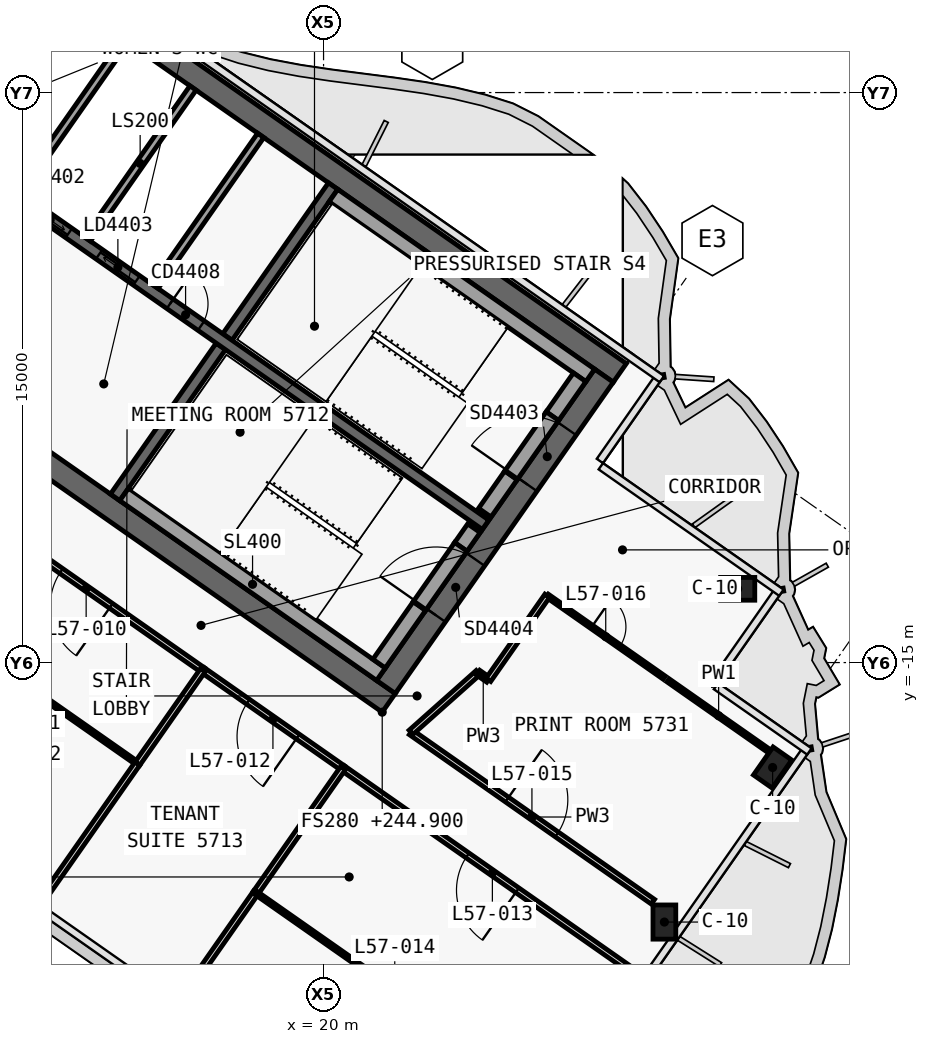
"""IFC4 building model, lengths in metres.
Left out: names, types, materials, properties, quantities, classifications, styles, units other than length and angle.
Written with IfcOpenShell. Run it as: python <this file> out.ifc"""

import sys

from ifc_helpers import new_model, si_unit, direction, frame, frame_2d, origin, origin_2d, place, context, subcontext, project, spatial, polyline, rectangle, outline, extrude, clip, halfspace, element, fill, save


model = new_model("IFC4")
c1 = context("Model", 3, precision=1e-05, world=origin(), true_north=direction((0.0, 1.0)))
c2 = subcontext(c1, "Body", "Model", "MODEL_VIEW")
j1 = project(units=[si_unit("LENGTHUNIT", "METRE"), si_unit("PLANEANGLEUNIT", "RADIAN")], contexts=[c1])
p1 = place(None, origin())
s1 = spatial("IfcSite", under=j1, at=p1, CompositionType="ELEMENT")
p2 = place(p1, origin())
s2 = spatial("IfcBuilding", under=s1, at=p2, CompositionType="ELEMENT")
p3 = place(p2, frame((0.0, 0.0, 244.9)))
s3 = spatial("IfcBuildingStorey", under=s2, at=p3, CompositionType="ELEMENT", Elevation=244.9)
p4 = place(p3, frame((0.028, 12.066, 0.0), z_axis=(0.0, 0.0, 1.0), x_axis=(0.819151382952, -0.573577380837, 0.0)))
e1 = element("IfcWall", 1, at=p4, inside=s3, PredefinedType="SHEAR", context=c2, shape_type="SweptSolid", body=[
    extrude(outline(polyline([(33.898, 0.3), (0.0, 0.3), (0.42, -0.3), (33.898, -0.3), (33.898, 0.3)])), origin(), (0.0, 0.0, 1.0), 3.9),
])
p5 = place(p3, frame((0.028, -0.874, 0.0), z_axis=(0.0, 0.0, 1.0), x_axis=(0.819150035022, -0.573579305871, 0.0)))
e2 = element("IfcWall", 2, at=p5, inside=s3, PredefinedType="SHEAR", context=c2, shape_type="SweptSolid", body=[
    extrude(outline(polyline([(26.476, 0.3), (0.0, 0.3), (0.42, -0.3), (26.476, -0.3), (26.476, 0.3)])), origin(), (0.0, 0.0, 1.0), 3.9),
])
p6 = place(p5, frame((6.576, 0.0, 0.0)))
e3 = element("IfcOpeningElement", 3, at=p6, cuts=e2, PredefinedType="OPENING", context=c2, shape_type="SweptSolid", body=[
    extrude(rectangle(XDim=1.5, YDim=2.1, at=frame_2d((0.75, 1.05))), frame((0.0, 0.31, 0.0), z_axis=(0.0, -1.0, 0.0), x_axis=(1.0, 0.0, 0.0)), (0.0, 0.0, 1.0), 0.62),
])
p7 = place(p5, frame((12.226, 0.0, 0.0)))
e4 = element("IfcOpeningElement", 4, at=p7, cuts=e2, PredefinedType="OPENING", context=c2, shape_type="SweptSolid", body=[
    extrude(rectangle(XDim=1.5, YDim=2.1, at=frame_2d((0.75, 1.05))), frame((0.0, 0.31, 0.0), z_axis=(0.0, -1.0, 0.0), x_axis=(1.0, 0.0, 0.0)), (0.0, 0.0, 1.0), 0.62),
])
p8 = place(p3, frame((21.642, -15.642, 0.0), z_axis=(0.0, 0.0, 1.0), x_axis=(0.573586866468, 0.819144740944, 0.0)))
e5 = element("IfcWall", 5, at=p8, inside=s3, PredefinedType="SHEAR", context=c2, shape_type="SweptSolid", body=[
    extrude(outline(polyline([(10.0, 0.3), (0.0, 0.3), (0.0, -0.3), (10.0, -0.3), (10.0, 0.3)])), origin(), (0.0, 0.0, 1.0), 3.9),
])
p9 = place(p8, frame((6.5, 0.0, 0.0)))
e6 = element("IfcOpeningElement", 6, at=p9, cuts=e5, PredefinedType="OPENING", context=c2, shape_type="SweptSolid", body=[
    extrude(rectangle(XDim=1.8, YDim=2.1, at=frame_2d((0.9, 1.05))), frame((0.0, 0.31, 0.0), z_axis=(0.0, -1.0, 0.0), x_axis=(1.0, 0.0, 0.0)), (0.0, 0.0, 1.0), 0.62),
])
p10 = place(p8, frame((2.3, 0.0, 0.0)))
e7 = element("IfcOpeningElement", 7, at=p10, cuts=e5, PredefinedType="OPENING", context=c2, shape_type="SweptSolid", body=[
    extrude(rectangle(XDim=1.8, YDim=2.1, at=frame_2d((0.9, 1.05))), frame((0.0, 0.31, 0.0), z_axis=(0.0, -1.0, 0.0), x_axis=(1.0, 0.0, 0.0)), (0.0, 0.0, 1.0), 0.62),
])
p11 = place(p3, frame((10.097, -1.271, 0.0), z_axis=(0.0, 0.0, 1.0), x_axis=(0.573560315113, 0.819163332265, 0.0)))
e8 = element("IfcWall", 8, at=p11, inside=s3, PredefinedType="SHEAR", context=c2, shape_type="SweptSolid", body=[
    extrude(outline(polyline([(4.85, -0.15), (4.85, 0.15), (0.0, 0.15), (0.0, -0.15), (4.85, -0.15)])), origin(), (0.0, 0.0, 1.0), 3.9),
])
p12 = place(p3, frame((14.515, -10.652, 0.0), z_axis=(0.0, 0.0, 1.0), x_axis=(0.573560315113, 0.819163332265, 0.0)))
e9 = element("IfcWall", 9, at=p12, inside=s3, PredefinedType="SHEAR", context=c2, shape_type="SweptSolid", body=[
    extrude(outline(polyline([(0.0, 0.15), (0.0, -0.15), (4.85, -0.15), (4.85, 0.15), (0.0, 0.15)])), origin(), (0.0, 0.0, 1.0), 3.9),
])
p13 = place(p3, frame((17.469, -6.433, 0.0), z_axis=(0.0, 0.0, 1.0), x_axis=(0.573594092424, 0.81913968109, 0.0)))
e10 = element("IfcWall", 10, at=p13, inside=s3, PredefinedType="SHEAR", context=c2, shape_type="SweptSolid", body=[
    extrude(outline(polyline([(4.85, -0.15), (4.85, 0.15), (0.0, 0.15), (0.0, -0.15), (4.85, -0.15)])), origin(), (0.0, 0.0, 1.0), 3.9),
])
p14 = place(p3, frame((2.638, 3.768, 0.0), z_axis=(0.0, 0.0, 1.0), x_axis=(0.819155014212, -0.573572194837, 0.0)))
e11 = element("IfcWall", 11, at=p14, inside=s3, PredefinedType="SHEAR", context=c2, shape_type="SweptSolid", body=[
    extrude(outline(polyline([(0.0, 0.15), (0.0, -0.15), (26.4, -0.15), (26.4, 0.15), (0.0, 0.15)])), origin(), (0.0, 0.0, 1.0), 3.9),
])
p15 = place(p14, frame((9.637, 0.0, 0.0)))
e12 = element("IfcOpeningElement", 12, at=p15, cuts=e11, PredefinedType="OPENING", context=c2, shape_type="SweptSolid", body=[
    extrude(rectangle(XDim=1.2, YDim=2.1, at=frame_2d((0.6, 1.05))), frame((0.0, 0.16, 0.0), z_axis=(0.0, -1.0, 0.0), x_axis=(1.0, 0.0, 0.0)), (0.0, 0.0, 1.0), 0.32),
])
p16 = place(p14, frame((11.812, 0.0, 0.0)))
e13 = element("IfcOpeningElement", 13, at=p16, cuts=e11, PredefinedType="OPENING", context=c2, shape_type="SweptSolid", body=[
    extrude(rectangle(XDim=1.2, YDim=2.1, at=frame_2d((0.6, 1.05))), frame((0.0, 0.16, 0.0), z_axis=(0.0, -1.0, 0.0), x_axis=(1.0, 0.0, 0.0)), (0.0, 0.0, 1.0), 0.32),
])
p17 = place(p14, frame((13.988, 0.0, 0.0)))
e14 = element("IfcOpeningElement", 14, at=p17, cuts=e11, PredefinedType="OPENING", context=c2, shape_type="SweptSolid", body=[
    extrude(rectangle(XDim=1.2, YDim=2.1, at=frame_2d((0.6, 1.05))), frame((0.0, 0.16, 0.0), z_axis=(0.0, -1.0, 0.0), x_axis=(1.0, 0.0, 0.0)), (0.0, 0.0, 1.0), 0.32),
])
p18 = place(p14, frame((16.262, 0.0, 0.0)))
e15 = element("IfcOpeningElement", 15, at=p18, cuts=e11, PredefinedType="OPENING", context=c2, shape_type="SweptSolid", body=[
    extrude(rectangle(XDim=1.0, YDim=2.1, at=frame_2d((0.5, 1.05))), frame((0.0, 0.16, 0.0), z_axis=(0.0, -1.0, 0.0), x_axis=(1.0, 0.0, 0.0)), (0.0, 0.0, 1.0), 0.32),
])
p19 = place(p3, frame((30.969, -12.956, 0.0), z_axis=(-0.334512857575, -0.477747821975, 0.812316543421), x_axis=(0.819159914019, -0.573565197047, 0.0)))
e16 = element("IfcColumn", 16, at=p19, inside=s3, PredefinedType="COLUMN", context=c2, shape_type="Clipping", body=[
    clip(clip(extrude(rectangle(XDim=0.9, YDim=0.6, at=origin_2d()), origin(), (0.0, 0.0, 1.0), 4.801), halfspace(frame((0.0, 0.0, 0.215), z_axis=(0.0, 0.0, 1.0), x_axis=(1.0, 0.0, 0.0)), True)), halfspace(frame((0.0, 0.0, 4.586), z_axis=(0.0, 0.0, 1.0), x_axis=(1.0, 0.0, 0.0)), False)),
])
p20 = place(p3, frame((28.891, -21.939, 0.0), z_axis=(0.291425634489, 0.416156539042, 0.861327367831), x_axis=(0.494070855631, 0.705534424526, -0.508050357174)))
e17 = element("IfcColumn", 17, at=p20, inside=s3, PredefinedType="COLUMN", context=c2, shape_type="Clipping", body=[
    clip(clip(extrude(rectangle(XDim=0.9, YDim=0.6, at=origin_2d()), origin(), (0.0, 0.0, 1.0), 4.528), halfspace(frame((0.0, 0.0, 0.265), z_axis=(0.0, 0.0, 1.0), x_axis=(1.0, 0.0, 0.0)), True)), halfspace(frame((0.0, 0.0, 4.262), z_axis=(0.0, 0.0, 1.0), x_axis=(1.0, 0.0, 0.0)), False)),
])
p21 = place(p3, frame((31.816, -17.761, 0.0), z_axis=(0.0, 0.0, 1.0), x_axis=(0.573576436351, 0.819152044289, 0.0)))
e18 = element("IfcColumn", 18, at=p21, inside=s3, PredefinedType="COLUMN", context=c2, shape_type="SweptSolid", body=[
    extrude(rectangle(XDim=0.9, YDim=0.6, at=origin_2d()), origin(), (0.0, 0.0, 1.0), 3.62),
])
p22 = place(p3, frame((12.001, -2.605, 0.0), z_axis=(0.0, 0.0, 1.0), x_axis=(0.573560315113, 0.819163332265, 0.0)))
e19 = element("IfcWall", 19, at=p22, inside=s3, PredefinedType="SOLIDWALL", context=c2, shape_type="SweptSolid", body=[
    extrude(rectangle(XDim=4.85, YDim=0.2, at=frame_2d((2.425, 0.0))), origin(), (0.0, 0.0, 1.0), 3.9),
])
p23 = place(p3, frame((13.783, -3.852, 0.0), z_axis=(0.0, 0.0, 1.0), x_axis=(0.573594092424, 0.81913968109, 0.0)))
e20 = element("IfcWall", 20, at=p23, inside=s3, PredefinedType="SOLIDWALL", context=c2, shape_type="SweptSolid", body=[
    extrude(rectangle(XDim=4.85, YDim=0.2, at=frame_2d((2.425, 0.0))), origin(), (0.0, 0.0, 1.0), 3.9),
])
p24 = place(p3, frame((15.565, -5.1, 0.0), z_axis=(0.0, 0.0, 1.0), x_axis=(0.573560315113, 0.819163332265, 0.0)))
e21 = element("IfcWall", 21, at=p24, inside=s3, PredefinedType="SOLIDWALL", context=c2, shape_type="SweptSolid", body=[
    extrude(rectangle(XDim=4.85, YDim=0.2, at=frame_2d((2.425, 0.0))), origin(), (0.0, 0.0, 1.0), 3.9),
])
p25 = place(p3, frame((20.259, -2.71, 0.0), z_axis=(0.0, 0.0, 1.0), x_axis=(0.81914849389, -0.573581506813, 0.0)))
e22 = element("IfcWall", 22, at=p25, inside=s3, PredefinedType="SOLIDWALL", context=c2, shape_type="SweptSolid", body=[
    extrude(rectangle(XDim=8.25, YDim=0.4, at=frame_2d((4.125, 0.0))), origin(), (0.0, 0.0, 1.0), 3.62),
])
p26 = place(p3, frame((24.244, -11.055, 0.0), z_axis=(0.0, 0.0, 1.0), x_axis=(0.573571582932, 0.819155442668, 0.0)))
e23 = element("IfcWall", 23, at=p26, inside=s3, PredefinedType="SOLIDWALL", context=c2, shape_type="SweptSolid", body=[
    extrude(rectangle(XDim=1.2, YDim=0.4, at=frame_2d((0.6, 0.0))), origin(), (0.0, 0.0, 1.0), 3.62),
])
p27 = place(p3, frame((26.022, -8.515, 0.0), z_axis=(0.0, 0.0, 1.0), x_axis=(0.573619628835, 0.819121798889, 0.0)))
e24 = element("IfcWall", 24, at=p27, inside=s3, PredefinedType="SOLIDWALL", context=c2, shape_type="SweptSolid", body=[
    extrude(rectangle(XDim=1.25, YDim=0.4, at=frame_2d((0.625, 0.0))), origin(), (0.0, 0.0, 1.0), 3.62),
])
p28 = place(p3, frame((24.932, -10.072, 2.15), z_axis=(0.0, 0.0, 1.0), x_axis=(0.573591692345, 0.819141361715, 0.0)))
e25 = element("IfcWall", 25, at=p28, inside=s3, PredefinedType="SOLIDWALL", context=c2, shape_type="SweptSolid", body=[
    extrude(rectangle(XDim=1.9, YDim=0.4, at=frame_2d((0.95, 0.0))), origin(), (0.0, 0.0, 1.0), 1.47),
])
p29 = place(p3, frame((14.753, -10.574, 0.0), z_axis=(0.0, 0.0, 1.0), x_axis=(0.819158229677, -0.573567602601, 0.0)))
e26 = element("IfcWall", 26, at=p29, inside=s3, PredefinedType="SOLIDWALL", context=c2, shape_type="SweptSolid", body=[
    extrude(rectangle(XDim=8.25, YDim=0.4, at=frame_2d((4.125, 0.0))), origin(), (0.0, 0.0, 1.0), 3.62),
])
p30 = place(p3, frame((21.462, -15.028, 0.0), z_axis=(0.0, 0.0, 1.0), x_axis=(0.573559770908, 0.819163713305, 0.0)))
e27 = element("IfcWall", 27, at=p30, inside=s3, PredefinedType="SOLIDWALL", context=c2, shape_type="SweptSolid", body=[
    extrude(rectangle(XDim=1.85, YDim=0.4, at=frame_2d((0.925, 0.0))), origin(), (0.0, 0.0, 1.0), 3.62),
])
p31 = place(p3, frame((23.613, -11.956, 0.0), z_axis=(0.0, 0.0, 1.0), x_axis=(0.573435029941, 0.819251039936, 0.0)))
e28 = element("IfcWall", 28, at=p31, inside=s3, PredefinedType="SOLIDWALL", context=c2, shape_type="SweptSolid", body=[
    extrude(rectangle(XDim=0.6, YDim=0.4, at=frame_2d((0.3, 0.0))), origin(), (0.0, 0.0, 1.0), 3.62),
])
p32 = place(p3, frame((22.523, -13.512, 2.15), z_axis=(0.0, 0.0, 1.0), x_axis=(0.573591692345, 0.819141361715, 0.0)))
e29 = element("IfcWall", 29, at=p32, inside=s3, PredefinedType="SOLIDWALL", context=c2, shape_type="SweptSolid", body=[
    extrude(rectangle(XDim=1.9, YDim=0.4, at=frame_2d((0.95, 0.0))), origin(), (0.0, 0.0, 1.0), 1.47),
])
p33 = place(p3, frame((22.3, -16.835, 0.0), z_axis=(0.0, 0.0, 1.0), x_axis=(0.819153708931, -0.573574058989, 0.0)))
e30 = element("IfcWall", 30, at=p33, inside=s3, PredefinedType="PARTITIONING", context=c2, shape_type="SweptSolid", body=[
    extrude(rectangle(XDim=7.773, YDim=0.15, at=frame_2d((3.887, 0.0))), origin(), (0.0, 0.0, 1.0), 3.05),
])
p34 = place(p33, frame((3.087, 0.0, 0.0)))
e31 = element("IfcOpeningElement", 31, at=p34, cuts=e30, PredefinedType="OPENING", context=c2, shape_type="SweptSolid", body=[
    extrude(rectangle(XDim=1.6, YDim=2.1, at=frame_2d((0.8, 1.05))), frame((0.0, 0.085, 0.0), z_axis=(0.0, -1.0, 0.0), x_axis=(1.0, 0.0, 0.0)), (0.0, 0.0, 1.0), 0.17),
])
p35 = place(p3, frame((16.826, -15.2, 0.0), z_axis=(0.0, 0.0, 1.0), x_axis=(-0.819138671238, 0.573595534573, 0.0)))
e32 = element("IfcWall", 32, at=p35, inside=s3, PredefinedType="PARTITIONING", context=c2, shape_type="SweptSolid", body=[
    extrude(rectangle(XDim=7.504, YDim=0.15, at=frame_2d((3.752, 0.0))), origin(), (0.0, 0.0, 1.0), 3.05),
])
p36 = place(p35, frame((2.952, 0.0, 0.0)))
e33 = element("IfcOpeningElement", 33, at=p36, cuts=e32, PredefinedType="OPENING", context=c2, shape_type="SweptSolid", body=[
    extrude(rectangle(XDim=1.6, YDim=2.1, at=frame_2d((0.8, 1.05))), frame((0.0, 0.085, 0.0), z_axis=(0.0, -1.0, 0.0), x_axis=(1.0, 0.0, 0.0)), (0.0, 0.0, 1.0), 0.17),
])
p37 = place(p3, frame((20.513, -17.781, 0.0), z_axis=(0.0, 0.0, 1.0), x_axis=(-0.819165703328, 0.573556928727, 0.0)))
e34 = element("IfcWall", 34, at=p37, inside=s3, PredefinedType="PARTITIONING", context=c2, shape_type="SweptSolid", body=[
    extrude(rectangle(XDim=4.504, YDim=0.15, at=frame_2d((2.252, 0.0))), origin(), (0.0, 0.0, 1.0), 3.05),
])
p38 = place(p37, frame((1.452, 0.0, 0.0)))
e35 = element("IfcOpeningElement", 35, at=p38, cuts=e34, PredefinedType="OPENING", context=c2, shape_type="SweptSolid", body=[
    extrude(rectangle(XDim=1.6, YDim=2.1, at=frame_2d((0.8, 1.05))), frame((0.0, 0.085, 0.0), z_axis=(0.0, -1.0, 0.0), x_axis=(1.0, 0.0, 0.0)), (0.0, 0.0, 1.0), 0.17),
])
p39 = place(p3, frame((28.375, -23.287, 0.0), z_axis=(0.0, 0.0, 1.0), x_axis=(-0.819147101588, 0.573583495196, 0.0)))
e36 = element("IfcWall", 36, at=p39, inside=s3, PredefinedType="PARTITIONING", context=c2, shape_type="SweptSolid", body=[
    extrude(rectangle(XDim=9.602, YDim=0.15, at=frame_2d((4.801, 0.0))), origin(), (0.0, 0.0, 1.0), 3.0),
])
p40 = place(p39, frame((4.001, 0.0, 0.0)))
e37 = element("IfcOpeningElement", 37, at=p40, cuts=e36, PredefinedType="OPENING", context=c2, shape_type="SweptSolid", body=[
    extrude(rectangle(XDim=1.6, YDim=2.1, at=frame_2d((0.8, 1.05))), frame((0.0, 0.085, 0.0), z_axis=(0.0, -1.0, 0.0), x_axis=(1.0, 0.0, 0.0)), (0.0, 0.0, 1.0), 0.17),
])
p41 = place(p3, frame((29.065, -15.467, 0.0), z_axis=(0.0, 0.0, 1.0), x_axis=(0.819143686935, -0.573588371704, 0.0)))
e38 = element("IfcWall", 38, at=p41, inside=s3, PredefinedType="PARTITIONING", context=c2, shape_type="SweptSolid", body=[
    extrude(rectangle(XDim=3.25, YDim=0.1, at=frame_2d((1.625, 0.0))), origin(), (0.0, 0.0, 1.0), 3.0),
])
p42 = place(p3, frame((25.885, -13.24, 0.0), z_axis=(0.0, 0.0, 1.0), x_axis=(0.819137356649, -0.573597411904, 0.0)))
e39 = element("IfcWall", 39, at=p42, inside=s3, PredefinedType="PARTITIONING", context=c2, shape_type="SweptSolid", body=[
    extrude(rectangle(XDim=3.76, YDim=0.1, at=frame_2d((1.88, 0.0))), origin(), (0.0, 0.0, 1.0), 3.62),
])
p43 = place(p42, frame((1.43, 0.0, 0.0)))
e40 = element("IfcOpeningElement", 40, at=p43, cuts=e39, PredefinedType="OPENING", context=c2, shape_type="SweptSolid", body=[
    extrude(rectangle(XDim=0.9, YDim=2.1, at=frame_2d((0.45, 1.05))), frame((0.0, 0.06, 0.0), z_axis=(0.0, -1.0, 0.0), x_axis=(1.0, 0.0, 0.0)), (0.0, 0.0, 1.0), 0.12),
])
p44 = place(p3, frame((22.301, -16.836, 0.0), z_axis=(0.0, 0.0, 1.0), x_axis=(0.746924703007, 0.664908631345, 0.0)))
e41 = element("IfcWall", 41, at=p44, inside=s3, PredefinedType="PARTITIONING", context=c2, shape_type="SweptSolid", body=[
    extrude(rectangle(XDim=2.364, YDim=0.15, at=frame_2d((1.182, 0.0))), origin(), (0.0, 0.0, 1.0), 3.62),
])
p45 = place(p3, frame((24.067, -15.265, 0.0), z_axis=(0.0, 0.0, 1.0), x_axis=(0.819092976344, -0.573660784876, 0.0)))
e42 = element("IfcWall", 42, at=p45, inside=s3, PredefinedType="PARTITIONING", context=c2, shape_type="SweptSolid", body=[
    extrude(rectangle(XDim=0.33, YDim=0.15, at=frame_2d((0.165, 0.0))), origin(), (0.0, 0.0, 1.0), 3.62),
])
p46 = place(p3, frame((24.337, -15.454, 0.0), z_axis=(0.0, 0.0, 1.0), x_axis=(0.573626181702, 0.819117209968, 0.0)))
e43 = element("IfcWall", 43, at=p46, inside=s3, PredefinedType="PARTITIONING", context=c2, shape_type="SweptSolid", body=[
    extrude(rectangle(XDim=2.7, YDim=0.15, at=frame_2d((1.35, 0.0))), origin(), (0.0, 0.0, 1.0), 3.62),
])
p47 = place(p3, frame((15.104, -17.657, 0.0), z_axis=(0.0, 0.0, 1.0), x_axis=(-0.819137093595, 0.573597787563, 0.0)))
e44 = element("IfcWall", 44, at=p47, inside=s3, PredefinedType="PARTITIONING", context=c2, shape_type="SweptSolid", body=[
    extrude(rectangle(XDim=7.5, YDim=0.1, at=frame_2d((3.75, 0.0))), origin(), (0.0, 0.0, 1.0), 3.05),
])
p48 = place(p47, frame((3.3, 0.0, 0.0)))
e45 = element("IfcOpeningElement", 45, at=p48, cuts=e44, PredefinedType="OPENING", context=c2, shape_type="SweptSolid", body=[
    extrude(rectangle(XDim=0.9, YDim=2.1, at=frame_2d((0.45, 1.05))), frame((0.0, 0.06, 0.0), z_axis=(0.0, -1.0, 0.0), x_axis=(1.0, 0.0, 0.0)), (0.0, 0.0, 1.0), 0.12),
])
p49 = place(p3, frame((15.104, -17.657, 0.0), z_axis=(0.0, 0.0, 1.0), x_axis=(-0.573553393703, -0.819168178442, 0.0)))
e46 = element("IfcWall", 46, at=p49, inside=s3, PredefinedType="PARTITIONING", context=c2, shape_type="SweptSolid", body=[
    extrude(rectangle(XDim=4.499, YDim=0.15, at=frame_2d((2.25, 0.0))), origin(), (0.0, 0.0, 1.0), 3.0),
])
p50 = place(p3, frame((16.825, -15.199, 0.0), z_axis=(0.0, 0.0, 1.0), x_axis=(-0.573598887793, -0.819136323161, 0.0)))
e47 = element("IfcWall", 47, at=p50, inside=s3, PredefinedType="PARTITIONING", context=c2, shape_type="SweptSolid", body=[
    extrude(rectangle(XDim=3.0, YDim=0.15, at=frame_2d((1.5, 0.0))), origin(), (0.0, 0.0, 1.0), 3.62),
])
p51 = place(p3, frame((18.217, -21.056, 0.0), z_axis=(0.0, 0.0, 1.0), x_axis=(-0.573560731169, -0.819163040952, 0.0)))
e48 = element("IfcWall", 48, at=p51, inside=s3, PredefinedType="PARTITIONING", context=c2, shape_type="SweptSolid", body=[
    extrude(rectangle(XDim=2.831, YDim=0.15, at=frame_2d((1.416, 0.0))), origin(), (0.0, 0.0, 1.0), 3.05),
])
p52 = place(p3, frame((20.511, -17.78, 0.0), z_axis=(0.0, 0.0, 1.0), x_axis=(-0.573589265117, -0.819143061341, 0.0)))
e49 = element("IfcWall", 49, at=p52, inside=s3, PredefinedType="PARTITIONING", context=c2, shape_type="SweptSolid", body=[
    extrude(rectangle(XDim=4.002, YDim=0.15, at=frame_2d((2.001, 0.0))), origin(), (0.0, 0.0, 1.0), 3.05),
])
p53 = place(p3, frame((25.531, -26.18, 0.0), z_axis=(0.0, 0.0, 1.0), x_axis=(-0.819147140662, 0.573583439393, 0.0)))
e50 = element("IfcWall", 50, at=p53, inside=s3, PredefinedType="PARTITIONING", context=c2, shape_type="SweptSolid", body=[
    extrude(rectangle(XDim=8.93, YDim=0.1, at=frame_2d((4.465, 0.0))), origin(), (0.0, 0.0, 1.0), 3.0),
])
p54 = place(p53, frame((4.015, 0.0, 0.0)))
e51 = element("IfcOpeningElement", 51, at=p54, cuts=e50, PredefinedType="OPENING", context=c2, shape_type="SweptSolid", body=[
    extrude(rectangle(XDim=0.9, YDim=2.1, at=frame_2d((0.45, 1.05))), frame((0.0, 0.06, 0.0), z_axis=(0.0, -1.0, 0.0), x_axis=(1.0, 0.0, 0.0)), (0.0, 0.0, 1.0), 0.12),
])
p55 = place(p16, origin())
e52 = element("IfcDoor", 52, at=p55, inside=s3, OperationType="SLIDING_TO_RIGHT", PredefinedType="DOOR", context=c2, shape_type="SweptSolid", body=[
    extrude(rectangle(XDim=1.2, YDim=2.1, at=frame_2d((0.6, 1.05))), frame((0.0, 0.025, 0.0), z_axis=(0.0, -1.0, 0.0), x_axis=(1.0, 0.0, 0.0)), (0.0, 0.0, 1.0), 0.05),
])
fill(e13, e52)
p56 = place(p17, origin())
e53 = element("IfcDoor", 53, at=p56, inside=s3, OperationType="SLIDING_TO_LEFT", PredefinedType="DOOR", context=c2, shape_type="SweptSolid", body=[
    extrude(rectangle(XDim=1.2, YDim=2.1, at=frame_2d((0.6, 1.05))), frame((0.0, 0.025, 0.0), z_axis=(0.0, -1.0, 0.0), x_axis=(1.0, 0.0, 0.0)), (0.0, 0.0, 1.0), 0.05),
])
fill(e14, e53)
p57 = place(p18, origin())
e54 = element("IfcDoor", 54, at=p57, inside=s3, OperationType="SINGLE_SWING_RIGHT", PredefinedType="DOOR", context=c2, shape_type="SweptSolid", body=[
    extrude(rectangle(XDim=1.0, YDim=2.1, at=frame_2d((0.5, 1.05))), frame((0.0, 0.025, 0.0), z_axis=(0.0, -1.0, 0.0), x_axis=(1.0, 0.0, 0.0)), (0.0, 0.0, 1.0), 0.05),
])
fill(e15, e54)
p58 = place(p9, origin())
e55 = element("IfcDoor", 55, at=p58, inside=s3, OperationType="DOUBLE_DOOR_SINGLE_SWING", PredefinedType="DOOR", context=c2, shape_type="SweptSolid", body=[
    extrude(rectangle(XDim=1.8, YDim=2.1, at=frame_2d((0.9, 1.05))), frame((0.0, 0.025, 0.0), z_axis=(0.0, -1.0, 0.0), x_axis=(1.0, 0.0, 0.0)), (0.0, 0.0, 1.0), 0.05),
])
fill(e6, e55)
p59 = place(p10, origin())
e56 = element("IfcDoor", 56, at=p59, inside=s3, OperationType="DOUBLE_DOOR_SINGLE_SWING", PredefinedType="DOOR", context=c2, shape_type="SweptSolid", body=[
    extrude(rectangle(XDim=1.8, YDim=2.1, at=frame_2d((0.9, 1.05))), frame((0.0, 0.025, 0.0), z_axis=(0.0, -1.0, 0.0), x_axis=(1.0, 0.0, 0.0)), (0.0, 0.0, 1.0), 0.05),
])
fill(e7, e56)
p60 = place(p36, origin())
e57 = element("IfcDoor", 57, at=p60, inside=s3, OperationType="DOUBLE_DOOR_SINGLE_SWING", PredefinedType="DOOR", context=c2, shape_type="SweptSolid", body=[
    extrude(rectangle(XDim=1.6, YDim=2.1, at=frame_2d((0.8, 1.05))), frame((0.0, 0.025, 0.0), z_axis=(0.0, -1.0, 0.0), x_axis=(1.0, 0.0, 0.0)), (0.0, 0.0, 1.0), 0.05),
])
fill(e33, e57)
p61 = place(p38, origin())
e58 = element("IfcDoor", 58, at=p61, inside=s3, OperationType="DOUBLE_DOOR_SINGLE_SWING", PredefinedType="DOOR", context=c2, shape_type="SweptSolid", body=[
    extrude(rectangle(XDim=1.6, YDim=2.1, at=frame_2d((0.8, 1.05))), frame((0.0, 0.025, 0.0), z_axis=(0.0, -1.0, 0.0), x_axis=(1.0, 0.0, 0.0)), (0.0, 0.0, 1.0), 0.05),
])
fill(e35, e58)
p62 = place(p40, origin())
e59 = element("IfcDoor", 59, at=p62, inside=s3, OperationType="DOUBLE_DOOR_SINGLE_SWING", PredefinedType="DOOR", context=c2, shape_type="SweptSolid", body=[
    extrude(rectangle(XDim=1.6, YDim=2.1, at=frame_2d((0.8, 1.05))), frame((0.0, 0.025, 0.0), z_axis=(0.0, -1.0, 0.0), x_axis=(1.0, 0.0, 0.0)), (0.0, 0.0, 1.0), 0.05),
])
fill(e37, e59)
p63 = place(p34, origin())
e60 = element("IfcDoor", 60, at=p63, inside=s3, OperationType="DOUBLE_DOOR_SINGLE_SWING", PredefinedType="DOOR", context=c2, shape_type="SweptSolid", body=[
    extrude(rectangle(XDim=1.6, YDim=2.1, at=frame_2d((0.8, 1.05))), frame((0.0, 0.025, 0.0), z_axis=(0.0, -1.0, 0.0), x_axis=(1.0, 0.0, 0.0)), (0.0, 0.0, 1.0), 0.05),
])
fill(e31, e60)
p64 = place(p43, origin())
e61 = element("IfcDoor", 61, at=p64, inside=s3, OperationType="SINGLE_SWING_LEFT", PredefinedType="DOOR", context=c2, shape_type="SweptSolid", body=[
    extrude(rectangle(XDim=0.9, YDim=2.1, at=frame_2d((0.45, 1.05))), frame((0.0, 0.025, 0.0), z_axis=(0.0, -1.0, 0.0), x_axis=(1.0, 0.0, 0.0)), (0.0, 0.0, 1.0), 0.05),
])
fill(e40, e61)
save(model, sys.argv[1])
